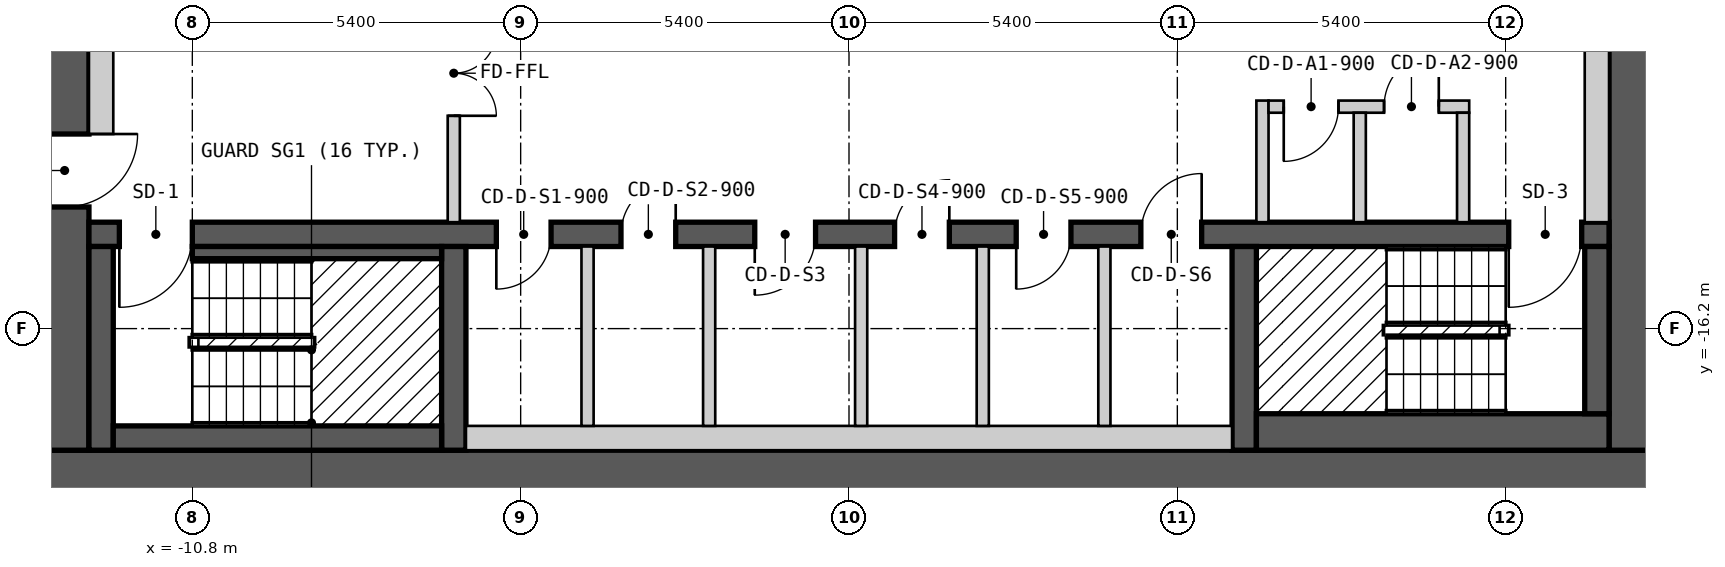
"""IFC4 building model, lengths in metres.
Left out: names, types, materials, properties, quantities, classifications, styles, units other than length and angle.
Written with IfcOpenShell. Run it as: python <this file> out.ifc"""

import sys

from ifc_helpers import new_model, si_unit, direction, frame, frame_2d, origin, place, context, subcontext, project, spatial, rectangle, extrude, element, fill, save


model = new_model("IFC4")
c1 = context("Model", 3, precision=1e-05, world=origin(), true_north=direction((0.0, 1.0)))
c2 = subcontext(c1, "Body", "Model", "MODEL_VIEW")
j1 = project(units=[si_unit("LENGTHUNIT", "METRE"), si_unit("PLANEANGLEUNIT", "RADIAN")], contexts=[c1])
p1 = place(None, origin())
s1 = spatial("IfcSite", under=j1, at=p1, CompositionType="ELEMENT")
p2 = place(p1, origin())
s2 = spatial("IfcBuilding", under=s1, at=p2, CompositionType="ELEMENT")
p3 = place(p2, frame((0.0, 0.0, 138.6)))
s3 = spatial("IfcBuildingStorey", under=s2, at=p3, CompositionType="ELEMENT", Elevation=138.6)
p4 = place(p3, frame((-13.3, -18.6, 0.0), z_axis=(0.0, 0.0, 1.0), x_axis=(1.0, 0.0, 0.0)))
e1 = element("IfcWall", 1, at=p4, inside=s3, PredefinedType="SHEAR", context=c2, shape_type="SweptSolid", body=[
    extrude(rectangle(XDim=26.6, YDim=0.8, at=frame_2d((13.3, 0.0))), origin(), (0.0, 0.0, 1.0), 2.7),
])
p5 = place(p3, frame((-12.9, -18.2, 0.0), z_axis=(0.0, 0.0, 1.0), x_axis=(0.0, 1.0, 0.0)))
e2 = element("IfcWall", 2, at=p5, inside=s3, PredefinedType="SHEAR", context=c2, shape_type="SweptSolid", body=[
    extrude(rectangle(XDim=12.4, YDim=0.8, at=frame_2d((6.2, 0.0))), origin(), (0.0, 0.0, 1.0), 2.7),
])
p6 = place(p5, frame((4.0, 0.0, 0.0)))
e3 = element("IfcOpeningElement", 3, at=p6, cuts=e2, PredefinedType="OPENING", context=c2, shape_type="SweptSolid", body=[
    extrude(rectangle(XDim=1.2, YDim=2.1, at=frame_2d((0.6, 1.05))), frame((0.0, 0.41, 0.0), z_axis=(0.0, -1.0, 0.0), x_axis=(1.0, 0.0, 0.0)), (0.0, 0.0, 1.0), 0.82),
])
p7 = place(p3, frame((12.9, -18.2, 0.0), z_axis=(0.0, 0.0, 1.0), x_axis=(0.0, 1.0, 0.0)))
e4 = element("IfcWall", 4, at=p7, inside=s3, PredefinedType="SHEAR", context=c2, shape_type="SweptSolid", body=[
    extrude(rectangle(XDim=12.4, YDim=0.8, at=frame_2d((6.2, 0.0))), origin(), (0.0, 0.0, 1.0), 2.7),
])
p8 = place(p3, frame((-12.5, -14.65, 0.0), z_axis=(0.0, 0.0, 1.0), x_axis=(1.0, 0.0, 0.0)))
e5 = element("IfcWall", 5, at=p8, inside=s3, PredefinedType="SHEAR", context=c2, shape_type="SweptSolid", body=[
    extrude(rectangle(XDim=25.0, YDim=0.4, at=frame_2d((12.5, 0.0))), origin(), (0.0, 0.0, 1.0), 2.7),
])
p9 = place(p8, frame((1.7, 0.0, 0.0), z_axis=(0.0, 0.0, 1.0), x_axis=(-1.0, 0.0, 0.0)))
e6 = element("IfcOpeningElement", 6, at=p9, cuts=e5, PredefinedType="OPENING", context=c2, shape_type="SweptSolid", body=[
    extrude(rectangle(XDim=1.2, YDim=2.1, at=frame_2d((0.6, 1.05))), frame((0.0, 0.21, 0.0), z_axis=(0.0, -1.0, 0.0), x_axis=(1.0, 0.0, 0.0)), (0.0, 0.0, 1.0), 0.42),
])
p10 = place(p8, frame((24.55, 0.0, 0.0), z_axis=(0.0, 0.0, 1.0), x_axis=(-1.0, 0.0, 0.0)))
e7 = element("IfcOpeningElement", 7, at=p10, cuts=e5, PredefinedType="OPENING", context=c2, shape_type="SweptSolid", body=[
    extrude(rectangle(XDim=1.2, YDim=2.1, at=frame_2d((0.6, 1.05))), frame((0.0, 0.21, 0.0), z_axis=(0.0, -1.0, 0.0), x_axis=(1.0, 0.0, 0.0)), (0.0, 0.0, 1.0), 0.42),
])
p11 = place(p8, frame((7.6, 0.0, 0.0), z_axis=(0.0, 0.0, 1.0), x_axis=(-1.0, 0.0, 0.0)))
e8 = element("IfcOpeningElement", 8, at=p11, cuts=e5, PredefinedType="OPENING", context=c2, shape_type="SweptSolid", body=[
    extrude(rectangle(XDim=0.9, YDim=2.1, at=frame_2d((0.45, 1.05))), frame((0.0, 0.21, 0.0), z_axis=(0.0, -1.0, 0.0), x_axis=(1.0, 0.0, 0.0)), (0.0, 0.0, 1.0), 0.42),
])
p12 = place(p8, frame((9.65, 0.0, 0.0), z_axis=(0.0, 0.0, 1.0), x_axis=(-1.0, 0.0, 0.0)))
e9 = element("IfcOpeningElement", 9, at=p12, cuts=e5, PredefinedType="OPENING", context=c2, shape_type="SweptSolid", body=[
    extrude(rectangle(XDim=0.9, YDim=2.1, at=frame_2d((0.45, 1.05))), frame((0.0, 0.21, 0.0), z_axis=(0.0, -1.0, 0.0), x_axis=(1.0, 0.0, 0.0)), (0.0, 0.0, 1.0), 0.42),
])
p13 = place(p8, frame((11.95, 0.0, 0.0), z_axis=(0.0, 0.0, 1.0), x_axis=(-1.0, 0.0, 0.0)))
e10 = element("IfcOpeningElement", 10, at=p13, cuts=e5, PredefinedType="OPENING", context=c2, shape_type="SweptSolid", body=[
    extrude(rectangle(XDim=1.0, YDim=2.1, at=frame_2d((0.5, 1.05))), frame((0.0, 0.21, 0.0), z_axis=(0.0, -1.0, 0.0), x_axis=(1.0, 0.0, 0.0)), (0.0, 0.0, 1.0), 0.42),
])
p14 = place(p8, frame((14.15, 0.0, 0.0), z_axis=(0.0, 0.0, 1.0), x_axis=(-1.0, 0.0, 0.0)))
e11 = element("IfcOpeningElement", 11, at=p14, cuts=e5, PredefinedType="OPENING", context=c2, shape_type="SweptSolid", body=[
    extrude(rectangle(XDim=0.9, YDim=2.1, at=frame_2d((0.45, 1.05))), frame((0.0, 0.21, 0.0), z_axis=(0.0, -1.0, 0.0), x_axis=(1.0, 0.0, 0.0)), (0.0, 0.0, 1.0), 0.42),
])
p15 = place(p8, frame((16.15, 0.0, 0.0), z_axis=(0.0, 0.0, 1.0), x_axis=(-1.0, 0.0, 0.0)))
e12 = element("IfcOpeningElement", 12, at=p15, cuts=e5, PredefinedType="OPENING", context=c2, shape_type="SweptSolid", body=[
    extrude(rectangle(XDim=0.9, YDim=2.1, at=frame_2d((0.45, 1.05))), frame((0.0, 0.21, 0.0), z_axis=(0.0, -1.0, 0.0), x_axis=(1.0, 0.0, 0.0)), (0.0, 0.0, 1.0), 0.42),
])
p16 = place(p8, frame((18.3, 0.0, 0.0), z_axis=(0.0, 0.0, 1.0), x_axis=(-1.0, 0.0, 0.0)))
e13 = element("IfcOpeningElement", 13, at=p16, cuts=e5, PredefinedType="OPENING", context=c2, shape_type="SweptSolid", body=[
    extrude(rectangle(XDim=1.0, YDim=2.1, at=frame_2d((0.5, 1.05))), frame((0.0, 0.21, 0.0), z_axis=(0.0, -1.0, 0.0), x_axis=(1.0, 0.0, 0.0)), (0.0, 0.0, 1.0), 0.42),
])
for number, where, z_axis, x_axis in (
    (14, (-6.5, -18.2, 0.0), (0.0, 0.0, 1.0), (0.0, 1.0, 0.0)),
    (15, (6.5, -18.2, 0.0), (0.0, 0.0, 1.0), (0.0, 1.0, 0.0)),
):
    element("IfcWall", number, at=place(p3, frame(where, z_axis=z_axis, x_axis=x_axis)), inside=s3, PredefinedType="SHEAR", context=c2, shape_type="SweptSolid", body=[
        extrude(rectangle(XDim=3.35, YDim=0.4, at=frame_2d((1.675, 0.0))), origin(), (0.0, 0.0, 1.0), 2.7),
    ])
p17 = place(p3, frame((-12.3, -18.2, 0.0), z_axis=(0.0, 0.0, 1.0), x_axis=(0.0, 1.0, 0.0)))
e16 = element("IfcWall", 16, at=p17, inside=s3, PredefinedType="SOLIDWALL", context=c2, shape_type="SweptSolid", body=[
    extrude(rectangle(XDim=3.35, YDim=0.4, at=frame_2d((1.675, 0.0))), origin(), (0.0, 0.0, 1.0), 2.7),
])
p18 = place(p3, frame((-12.3, -13.0, 0.0), z_axis=(0.0, 0.0, 1.0), x_axis=(0.0, 1.0, 0.0)))
e17 = element("IfcWall", 17, at=p18, inside=s3, PredefinedType="PARTITIONING", context=c2, shape_type="SweptSolid", body=[
    extrude(rectangle(XDim=3.45, YDim=0.4, at=frame_2d((1.725, 0.0))), origin(), (0.0, 0.0, 1.0), 2.7),
])
p19 = place(p3, frame((-12.1, -18.0, 0.0), z_axis=(0.0, 0.0, 1.0), x_axis=(1.0, 0.0, 0.0)))
e18 = element("IfcWall", 18, at=p19, inside=s3, PredefinedType="SOLIDWALL", context=c2, shape_type="SweptSolid", body=[
    extrude(rectangle(XDim=5.4, YDim=0.4, at=frame_2d((2.7, 0.0))), origin(), (0.0, 0.0, 1.0), 2.7),
])
p20 = place(p3, frame((-10.8, -14.95, 0.0), z_axis=(0.0, 0.0, 1.0), x_axis=(1.0, 0.0, 0.0)))
e19 = element("IfcWall", 19, at=p20, inside=s3, PredefinedType="SOLIDWALL", context=c2, shape_type="SweptSolid", body=[
    extrude(rectangle(XDim=4.1, YDim=0.2, at=frame_2d((2.05, 0.0))), origin(), (0.0, 0.0, 1.0), 2.7),
])
p21 = place(p3, frame((-6.5, -14.45, 0.0), z_axis=(0.0, 0.0, 1.0), x_axis=(0.0, 1.0, 0.0)))
e20 = element("IfcWall", 20, at=p21, inside=s3, PredefinedType="PARTITIONING", context=c2, shape_type="SweptSolid", body=[
    extrude(rectangle(XDim=4.9, YDim=0.2, at=frame_2d((2.45, 0.0))), origin(), (0.0, 0.0, 1.0), 2.7),
])
p22 = place(p21, frame((3.15, 0.0, 0.0), z_axis=(0.0, 0.0, 1.0), x_axis=(-1.0, 0.0, 0.0)))
e21 = element("IfcOpeningElement", 21, at=p22, cuts=e20, PredefinedType="OPENING", context=c2, shape_type="SweptSolid", body=[
    extrude(rectangle(XDim=1.4, YDim=2.1, at=frame_2d((0.7, 1.05))), frame((0.0, 0.11, 0.0), z_axis=(0.0, -1.0, 0.0), x_axis=(1.0, 0.0, 0.0)), (0.0, 0.0, 1.0), 0.22),
])
p23 = place(p3, frame((-6.3, -18.0, 0.0), z_axis=(0.0, 0.0, 1.0), x_axis=(1.0, 0.0, 0.0)))
e22 = element("IfcWall", 22, at=p23, inside=s3, PredefinedType="PARTITIONING", context=c2, shape_type="SweptSolid", body=[
    extrude(rectangle(XDim=12.6, YDim=0.4, at=frame_2d((6.3, 0.0))), origin(), (0.0, 0.0, 1.0), 2.7),
])
for number, where, z_axis, x_axis in (
    (23, (-4.3, -17.8, 0.0), (0.0, 0.0, 1.0), (0.0, 1.0, 0.0)),
    (24, (-2.3, -17.8, 0.0), (0.0, 0.0, 1.0), (0.0, 1.0, 0.0)),
    (25, (0.2, -17.8, 0.0), (0.0, 0.0, 1.0), (0.0, 1.0, 0.0)),
    (26, (2.2, -17.8, 0.0), (0.0, 0.0, 1.0), (0.0, 1.0, 0.0)),
    (27, (4.2, -17.8, 0.0), (0.0, 0.0, 1.0), (0.0, 1.0, 0.0)),
):
    element("IfcWall", number, at=place(p3, frame(where, z_axis=z_axis, x_axis=x_axis)), inside=s3, PredefinedType="PARTITIONING", context=c2, shape_type="SweptSolid", body=[
        extrude(rectangle(XDim=2.95, YDim=0.2, at=frame_2d((1.475, 0.0))), origin(), (0.0, 0.0, 1.0), 2.7),
    ])
p24 = place(p3, frame((6.7, -17.9, 0.0), z_axis=(0.0, 0.0, 1.0), x_axis=(1.0, 0.0, 0.0)))
e28 = element("IfcWall", 28, at=p24, inside=s3, PredefinedType="SOLIDWALL", context=c2, shape_type="SweptSolid", body=[
    extrude(rectangle(XDim=5.8, YDim=0.6, at=frame_2d((2.9, 0.0))), origin(), (0.0, 0.0, 1.0), 2.7),
])
p25 = place(p3, frame((6.8, -14.45, 0.0), z_axis=(0.0, 0.0, 1.0), x_axis=(0.0, 1.0, 0.0)))
e29 = element("IfcWall", 29, at=p25, inside=s3, PredefinedType="PARTITIONING", context=c2, shape_type="SweptSolid", body=[
    extrude(rectangle(XDim=2.0, YDim=0.2, at=frame_2d((1.0, 0.0))), origin(), (0.0, 0.0, 1.0), 2.7),
])
p26 = place(p3, frame((6.9, -12.55, 0.0), z_axis=(0.0, 0.0, 1.0), x_axis=(1.0, 0.0, 0.0)))
e30 = element("IfcWall", 30, at=p26, inside=s3, PredefinedType="PARTITIONING", context=c2, shape_type="SweptSolid", body=[
    extrude(rectangle(XDim=3.3, YDim=0.2, at=frame_2d((1.65, 0.0))), origin(), (0.0, 0.0, 1.0), 2.7),
])
p27 = place(p26, frame((1.15, 0.0, 0.0), z_axis=(0.0, 0.0, 1.0), x_axis=(-1.0, 0.0, 0.0)))
e31 = element("IfcOpeningElement", 31, at=p27, cuts=e30, PredefinedType="OPENING", context=c2, shape_type="SweptSolid", body=[
    extrude(rectangle(XDim=0.9, YDim=2.1, at=frame_2d((0.45, 1.05))), frame((0.0, 0.11, 0.0), z_axis=(0.0, -1.0, 0.0), x_axis=(1.0, 0.0, 0.0)), (0.0, 0.0, 1.0), 0.22),
])
p28 = place(p26, frame((2.8, 0.0, 0.0), z_axis=(0.0, 0.0, 1.0), x_axis=(-1.0, 0.0, 0.0)))
e32 = element("IfcOpeningElement", 32, at=p28, cuts=e30, PredefinedType="OPENING", context=c2, shape_type="SweptSolid", body=[
    extrude(rectangle(XDim=0.9, YDim=2.1, at=frame_2d((0.45, 1.05))), frame((0.0, 0.11, 0.0), z_axis=(0.0, -1.0, 0.0), x_axis=(1.0, 0.0, 0.0)), (0.0, 0.0, 1.0), 0.22),
])
for number, where, z_axis, x_axis in (
    (33, (8.4, -14.45, 0.0), (0.0, 0.0, 1.0), (0.0, 1.0, 0.0)),
    (34, (10.1, -14.45, 0.0), (0.0, 0.0, 1.0), (0.0, 1.0, 0.0)),
):
    element("IfcWall", number, at=place(p3, frame(where, z_axis=z_axis, x_axis=x_axis)), inside=s3, PredefinedType="PARTITIONING", context=c2, shape_type="SweptSolid", body=[
        extrude(rectangle(XDim=1.8, YDim=0.2, at=frame_2d((0.9, 0.0))), origin(), (0.0, 0.0, 1.0), 2.7),
    ])
p29 = place(p3, frame((12.3, -17.6, 0.0), z_axis=(0.0, 0.0, 1.0), x_axis=(0.0, 1.0, 0.0)))
e35 = element("IfcWall", 35, at=p29, inside=s3, PredefinedType="SOLIDWALL", context=c2, shape_type="SweptSolid", body=[
    extrude(rectangle(XDim=2.75, YDim=0.4, at=frame_2d((1.375, 0.0))), origin(), (0.0, 0.0, 1.0), 2.7),
])
p30 = place(p3, frame((12.3, -14.45, 0.0), z_axis=(0.0, 0.0, 1.0), x_axis=(0.0, 1.0, 0.0)))
e36 = element("IfcWall", 36, at=p30, inside=s3, PredefinedType="PARTITIONING", context=c2, shape_type="SweptSolid", body=[
    extrude(rectangle(XDim=8.25, YDim=0.4, at=frame_2d((4.125, 0.0))), origin(), (0.0, 0.0, 1.0), 2.7),
])
p31 = place(p9, origin())
e37 = element("IfcDoor", 37, at=p31, inside=s3, OperationType="SINGLE_SWING_RIGHT", PredefinedType="DOOR", context=c2, shape_type="SweptSolid", body=[
    extrude(rectangle(XDim=1.2, YDim=2.1, at=frame_2d((0.6, 1.05))), frame((0.0, 0.025, 0.0), z_axis=(0.0, -1.0, 0.0), x_axis=(1.0, 0.0, 0.0)), (0.0, 0.0, 1.0), 0.05),
])
fill(e6, e37)
p32 = place(p10, origin())
e38 = element("IfcDoor", 38, at=p32, inside=s3, OperationType="SINGLE_SWING_RIGHT", PredefinedType="DOOR", context=c2, shape_type="SweptSolid", body=[
    extrude(rectangle(XDim=1.2, YDim=2.1, at=frame_2d((0.6, 1.05))), frame((0.0, 0.025, 0.0), z_axis=(0.0, -1.0, 0.0), x_axis=(1.0, 0.0, 0.0)), (0.0, 0.0, 1.0), 0.05),
])
fill(e7, e38)
p33 = place(p6, origin())
e39 = element("IfcDoor", 39, at=p33, inside=s3, OperationType="SINGLE_SWING_RIGHT", PredefinedType="DOOR", context=c2, shape_type="SweptSolid", body=[
    extrude(rectangle(XDim=1.2, YDim=2.1, at=frame_2d((0.6, 1.05))), frame((0.0, 0.025, 0.0), z_axis=(0.0, -1.0, 0.0), x_axis=(1.0, 0.0, 0.0)), (0.0, 0.0, 1.0), 0.05),
])
fill(e3, e39)
p34 = place(p22, origin())
e40 = element("IfcDoor", 40, at=p34, inside=s3, OperationType="DOUBLE_DOOR_SINGLE_SWING", PredefinedType="DOOR", context=c2, shape_type="SweptSolid", body=[
    extrude(rectangle(XDim=1.4, YDim=2.1, at=frame_2d((0.7, 1.05))), frame((0.0, 0.025, 0.0), z_axis=(0.0, -1.0, 0.0), x_axis=(1.0, 0.0, 0.0)), (0.0, 0.0, 1.0), 0.05),
])
fill(e21, e40)
p35 = place(p27, origin())
e41 = element("IfcDoor", 41, at=p35, inside=s3, OperationType="SINGLE_SWING_RIGHT", PredefinedType="DOOR", context=c2, shape_type="SweptSolid", body=[
    extrude(rectangle(XDim=0.9, YDim=2.1, at=frame_2d((0.45, 1.05))), frame((0.0, 0.025, 0.0), z_axis=(0.0, -1.0, 0.0), x_axis=(1.0, 0.0, 0.0)), (0.0, 0.0, 1.0), 0.05),
])
fill(e31, e41)
p36 = place(p28, origin())
e42 = element("IfcDoor", 42, at=p36, inside=s3, OperationType="SINGLE_SWING_LEFT", PredefinedType="DOOR", context=c2, shape_type="SweptSolid", body=[
    extrude(rectangle(XDim=0.9, YDim=2.1, at=frame_2d((0.45, 1.05))), frame((0.0, 0.025, 0.0), z_axis=(0.0, -1.0, 0.0), x_axis=(1.0, 0.0, 0.0)), (0.0, 0.0, 1.0), 0.05),
])
fill(e32, e42)
p37 = place(p11, origin())
e43 = element("IfcDoor", 43, at=p37, inside=s3, OperationType="SINGLE_SWING_RIGHT", PredefinedType="DOOR", context=c2, shape_type="SweptSolid", body=[
    extrude(rectangle(XDim=0.9, YDim=2.1, at=frame_2d((0.45, 1.05))), frame((0.0, 0.025, 0.0), z_axis=(0.0, -1.0, 0.0), x_axis=(1.0, 0.0, 0.0)), (0.0, 0.0, 1.0), 0.05),
])
fill(e8, e43)
p38 = place(p12, origin())
e44 = element("IfcDoor", 44, at=p38, inside=s3, OperationType="SINGLE_SWING_LEFT", PredefinedType="DOOR", context=c2, shape_type="SweptSolid", body=[
    extrude(rectangle(XDim=0.9, YDim=2.1, at=frame_2d((0.45, 1.05))), frame((0.0, 0.025, 0.0), z_axis=(0.0, -1.0, 0.0), x_axis=(1.0, 0.0, 0.0)), (0.0, 0.0, 1.0), 0.05),
])
fill(e9, e44)
p39 = place(p13, origin())
e45 = element("IfcDoor", 45, at=p39, inside=s3, OperationType="SINGLE_SWING_RIGHT", PredefinedType="DOOR", context=c2, shape_type="SweptSolid", body=[
    extrude(rectangle(XDim=1.0, YDim=2.1, at=frame_2d((0.5, 1.05))), frame((0.0, 0.025, 0.0), z_axis=(0.0, -1.0, 0.0), x_axis=(1.0, 0.0, 0.0)), (0.0, 0.0, 1.0), 0.05),
])
fill(e10, e45)
p40 = place(p14, origin())
e46 = element("IfcDoor", 46, at=p40, inside=s3, OperationType="SINGLE_SWING_LEFT", PredefinedType="DOOR", context=c2, shape_type="SweptSolid", body=[
    extrude(rectangle(XDim=0.9, YDim=2.1, at=frame_2d((0.45, 1.05))), frame((0.0, 0.025, 0.0), z_axis=(0.0, -1.0, 0.0), x_axis=(1.0, 0.0, 0.0)), (0.0, 0.0, 1.0), 0.05),
])
fill(e11, e46)
p41 = place(p15, origin())
e47 = element("IfcDoor", 47, at=p41, inside=s3, OperationType="SINGLE_SWING_RIGHT", PredefinedType="DOOR", context=c2, shape_type="SweptSolid", body=[
    extrude(rectangle(XDim=0.9, YDim=2.1, at=frame_2d((0.45, 1.05))), frame((0.0, 0.025, 0.0), z_axis=(0.0, -1.0, 0.0), x_axis=(1.0, 0.0, 0.0)), (0.0, 0.0, 1.0), 0.05),
])
fill(e12, e47)
p42 = place(p16, origin())
e48 = element("IfcDoor", 48, at=p42, inside=s3, OperationType="SINGLE_SWING_LEFT", PredefinedType="DOOR", context=c2, shape_type="SweptSolid", body=[
    extrude(rectangle(XDim=1.0, YDim=2.1, at=frame_2d((0.5, 1.05))), frame((0.0, 0.025, 0.0), z_axis=(0.0, -1.0, 0.0), x_axis=(1.0, 0.0, 0.0)), (0.0, 0.0, 1.0), 0.05),
])
fill(e13, e48)
save(model, sys.argv[1])
